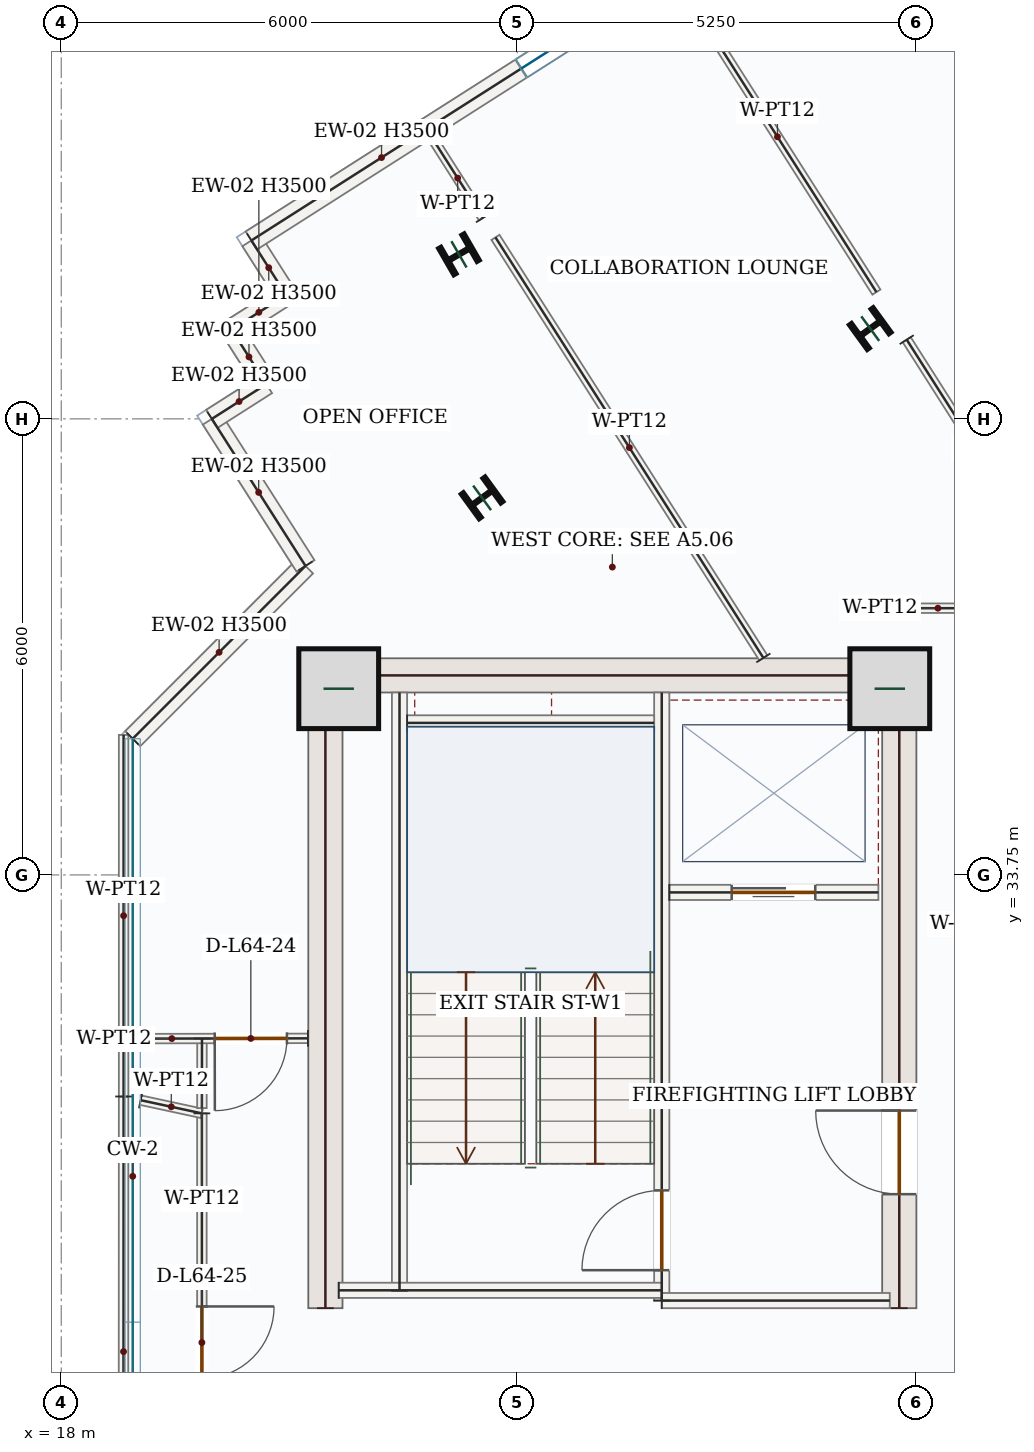
"""IFC4 building model, lengths in metres.
Left out: names, types, materials, properties, quantities, classifications, styles, units other than length and angle.
Written with IfcOpenShell. Run it as: python <this file> out.ifc"""

import sys

from ifc_helpers import new_model, si_unit, direction, frame, frame_2d, origin, origin_2d, place, context, subcontext, project, spatial, rectangle, i_section, extrude, source, transform, mapped, element, fill, save


model = new_model("IFC4")
c1 = context("Model", 3, precision=1e-05, world=origin(), true_north=direction((0.0, 1.0)))
c2 = subcontext(c1, "Body", "Model", "MODEL_VIEW")
j1 = project(units=[si_unit("LENGTHUNIT", "METRE"), si_unit("PLANEANGLEUNIT", "RADIAN")], contexts=[c1])
p1 = place(None, origin())
s1 = spatial("IfcSite", under=j1, at=p1, CompositionType="ELEMENT")
p2 = place(p1, origin())
s2 = spatial("IfcBuilding", under=s1, at=p2, CompositionType="ELEMENT")
p3 = place(p2, frame((0.0, 0.0, 269.1)))
s3 = spatial("IfcBuildingStorey", under=s2, at=p3, CompositionType="ELEMENT", Elevation=269.1)
m1 = source(origin(), c2, "Body", "SweptSolid", [
    extrude(rectangle(XDim=8.55, YDim=0.45, at=frame_2d((4.275, 0.0))), origin(), (0.0, 0.0, 1.0), 3.5),
])
p4 = place(p3, frame((21.475, 28.05, 0.0), z_axis=(0.0, 0.0, 1.0), x_axis=(0.0, 1.0, 0.0)))
e1 = element("IfcWall", 1, at=p4, inside=s3, PredefinedType="SHEAR", context=c2, shape_type="MappedRepresentation", body=[
    mapped(m1, transform((0.0, 0.0, 0.0), x_axis=(1.0, 0.0, 0.0), y_axis=(0.0, 1.0, 0.0), z_axis=(0.0, 0.0, 1.0), scale=1.0)),
])
p5 = place(p3, frame((29.025, 28.05, 0.0), z_axis=(0.0, 0.0, 1.0), x_axis=(0.0, 1.0, 0.0)))
e2 = element("IfcWall", 2, at=p5, inside=s3, PredefinedType="SHEAR", context=c2, shape_type="SweptSolid", body=[
    extrude(rectangle(XDim=8.55, YDim=0.45, at=frame_2d((4.275, 0.0))), origin(), (0.0, 0.0, 1.0), 3.5),
])
p6 = place(p5, frame((1.5, 0.0, 0.0)))
e3 = element("IfcOpeningElement", 3, at=p6, cuts=e2, PredefinedType="OPENING", context=c2, shape_type="SweptSolid", body=[
    extrude(rectangle(XDim=1.1, YDim=2.2, at=frame_2d((0.55, 1.1))), frame((0.0, 0.235, 0.0), z_axis=(0.0, -1.0, 0.0), x_axis=(1.0, 0.0, 0.0)), (0.0, 0.0, 1.0), 0.47),
])
m2 = source(origin(), c2, "Body", "SweptSolid", [
    extrude(rectangle(XDim=7.1, YDim=0.45, at=frame_2d((3.55, 0.0))), origin(), (0.0, 0.0, 1.0), 3.5),
])
p7 = place(p3, frame((21.7, 36.375, 0.0), z_axis=(0.0, 0.0, 1.0), x_axis=(1.0, 0.0, 0.0)))
e4 = element("IfcWall", 4, at=p7, inside=s3, PredefinedType="SHEAR", context=c2, shape_type="MappedRepresentation", body=[
    mapped(m2, transform((0.0, 0.0, 0.0), x_axis=(1.0, 0.0, 0.0), y_axis=(0.0, 1.0, 0.0), z_axis=(0.0, 0.0, 1.0), scale=1.0)),
])
m3 = source(origin(), c2, "Body", "SweptSolid", [
    extrude(rectangle(XDim=1.05, YDim=1.05, at=origin_2d()), origin(), (0.0, 0.0, 1.0), 3.75),
])
for number, where, z_axis, x_axis in (
    (5, (21.65, 36.2, 0.0), (0.0, 0.0, 1.0), (1.0, 0.0, 0.0)),
    (6, (28.9, 36.2, 0.0), (0.0, 0.0, 1.0), (1.0, 0.0, 0.0)),
):
    element("IfcColumn", number, at=place(p3, frame(where, z_axis=z_axis, x_axis=x_axis)), inside=s3, PredefinedType="COLUMN", context=c2, shape_type="MappedRepresentation", body=[
        mapped(m3, transform((0.0, 0.0, 0.0), x_axis=(1.0, 0.0, 0.0), y_axis=(0.0, 1.0, 0.0), z_axis=(0.0, 0.0, 1.0), scale=1.0)),
    ])
m4 = source(origin(), c2, "Body", "SweptSolid", [
    extrude(i_section(OverallWidth=0.399, OverallDepth=0.386, WebThickness=0.021, FlangeThickness=0.033, FilletRadius=0.018, at=origin_2d()), origin(), (0.0, 0.0, 1.0), 3.75),
])
for number, where, z_axis, x_axis in (
    (7, (28.643, 40.937, 0.0), (0.0, 0.0, 1.0), (-0.588, 0.809, 0.0)),
    (8, (23.536, 38.711, 0.0), (0.0, 0.0, 1.0), (-0.588, 0.809, 0.0)),
    (9, (23.232, 41.914, 0.0), (0.0, 0.0, 1.0), (-0.5, 0.866, 0.0)),
):
    element("IfcColumn", number, at=place(p3, frame(where, z_axis=z_axis, x_axis=x_axis)), inside=s3, PredefinedType="COLUMN", context=c2, shape_type="MappedRepresentation", body=[
        mapped(m4, transform((0.0, 0.0, 0.0), x_axis=(1.0, 0.0, 0.0), y_axis=(0.0, 1.0, 0.0), z_axis=(0.0, 0.0, 1.0), scale=1.0)),
    ])
m5 = source(origin(), c2, "Body", "SweptSolid", [
    extrude(rectangle(XDim=3.215, YDim=0.28, at=frame_2d((1.607, 0.0))), origin(), (0.0, 0.0, 1.0), 3.5),
])
p8 = place(p3, frame((18.94, 35.542, 0.0), z_axis=(0.0, 0.0, 1.0), x_axis=(0.707106781187, 0.707106781187, 0.0)))
e10 = element("IfcWall", 10, at=p8, inside=s3, PredefinedType="SOLIDWALL", context=c2, shape_type="MappedRepresentation", body=[
    mapped(m5, transform((0.0, 0.0, 0.0), x_axis=(1.0, 0.0, 0.0), y_axis=(0.0, 1.0, 0.0), z_axis=(0.0, 0.0, 1.0), scale=1.0)),
])
m6 = source(origin(), c2, "Body", "SweptSolid", [
    extrude(rectangle(XDim=2.293, YDim=0.28, at=frame_2d((1.147, 0.0))), origin(), (0.0, 0.0, 1.0), 3.5),
])
p9 = place(p3, frame((21.213, 37.815, 0.0), z_axis=(0.0, 0.0, 1.0), x_axis=(-0.53726116654, 0.843415934713, 0.0)))
e11 = element("IfcWall", 11, at=p9, inside=s3, PredefinedType="SOLIDWALL", context=c2, shape_type="MappedRepresentation", body=[
    mapped(m6, transform((0.0, 0.0, 0.0), x_axis=(1.0, 0.0, 0.0), y_axis=(0.0, 1.0, 0.0), z_axis=(0.0, 0.0, 1.0), scale=1.0)),
])
m7 = source(origin(), c2, "Body", "SweptSolid", [
    extrude(rectangle(XDim=0.85, YDim=0.28, at=frame_2d((0.425, 0.0))), origin(), (0.0, 0.0, 1.0), 3.5),
])
for number, where, z_axis, x_axis in (
    (12, (19.981, 39.75, 0.0), (0.0, 0.0, 1.0), (0.843, 0.537, 0.0)),
    (13, (20.698, 40.206, 0.0), (0.0, 0.0, 1.0), (-0.537, 0.843, 0.0)),
    (14, (20.241, 40.923, 0.0), (0.0, 0.0, 1.0), (0.843, 0.537, 0.0)),
    (15, (20.958, 41.38, 0.0), (0.0, 0.0, 1.0), (-0.537, 0.843, 0.0)),
):
    element("IfcWall", number, at=place(p3, frame(where, z_axis=z_axis, x_axis=x_axis)), inside=s3, PredefinedType="SOLIDWALL", context=c2, shape_type="MappedRepresentation", body=[
        mapped(m7, transform((0.0, 0.0, 0.0), x_axis=(1.0, 0.0, 0.0), y_axis=(0.0, 1.0, 0.0), z_axis=(0.0, 0.0, 1.0), scale=1.0)),
    ])
p10 = place(p3, frame((20.501, 42.097, 0.0), z_axis=(0.0, 0.0, 1.0), x_axis=(0.843388777764, 0.537303796322, 0.0)))
e16 = element("IfcWall", 16, at=p10, inside=s3, PredefinedType="SOLIDWALL", context=c2, shape_type="SweptSolid", body=[
    extrude(rectangle(XDim=9.92, YDim=0.28, at=frame_2d((4.96, 0.0))), origin(), (0.0, 0.0, 1.0), 3.5),
])
p11 = place(p10, frame((4.21, 0.0, 0.85)))
e17 = element("IfcOpeningElement", 17, at=p11, cuts=e16, PredefinedType="OPENING", context=c2, shape_type="SweptSolid", body=[
    extrude(rectangle(XDim=1.5, YDim=1.5, at=frame_2d((0.75, 0.75))), frame((0.0, 0.15, 0.0), z_axis=(0.0, -1.0, 0.0), x_axis=(1.0, 0.0, 0.0)), (0.0, 0.0, 1.0), 0.3),
])
m8 = source(origin(), c2, "Body", "SweptSolid", [
    extrude(rectangle(XDim=7.87, YDim=0.2, at=frame_2d((3.935, 0.0))), origin(), (0.0, 0.0, 1.0), 3.5),
])
p12 = place(p3, frame((22.45, 28.28, 0.0), z_axis=(0.0, 0.0, 1.0), x_axis=(0.0, 1.0, 0.0)))
e18 = element("IfcWall", 18, at=p12, inside=s3, PredefinedType="SOLIDWALL", context=c2, shape_type="MappedRepresentation", body=[
    mapped(m8, transform((0.0, 0.0, 0.0), x_axis=(1.0, 0.0, 0.0), y_axis=(0.0, 1.0, 0.0), z_axis=(0.0, 0.0, 1.0), scale=1.0)),
])
p13 = place(p3, frame((25.9, 28.15, 0.0), z_axis=(0.0, 0.0, 1.0), x_axis=(0.0, 1.0, 0.0)))
e19 = element("IfcWall", 19, at=p13, inside=s3, PredefinedType="SOLIDWALL", context=c2, shape_type="SweptSolid", body=[
    extrude(rectangle(XDim=8.0, YDim=0.2, at=frame_2d((4.0, 0.0))), origin(), (0.0, 0.0, 1.0), 3.5),
])
p14 = place(p13, frame((0.4, 0.0, 0.0)))
e20 = element("IfcOpeningElement", 20, at=p14, cuts=e19, PredefinedType="OPENING", context=c2, shape_type="SweptSolid", body=[
    extrude(rectangle(XDim=1.05, YDim=2.15, at=frame_2d((0.525, 1.075))), frame((0.0, 0.11, 0.0), z_axis=(0.0, -1.0, 0.0), x_axis=(1.0, 0.0, 0.0)), (0.0, 0.0, 1.0), 0.22),
])
m9 = source(origin(), c2, "Body", "SweptSolid", [
    extrude(rectangle(XDim=4.25, YDim=0.2, at=frame_2d((2.125, 0.0))), origin(), (0.0, 0.0, 1.0), 3.5),
])
p15 = place(p3, frame((21.65, 28.285, 0.0), z_axis=(0.0, 0.0, 1.0), x_axis=(1.0, 0.0, 0.0)))
e21 = element("IfcWall", 21, at=p15, inside=s3, PredefinedType="SOLIDWALL", context=c2, shape_type="MappedRepresentation", body=[
    mapped(m9, transform((0.0, 0.0, 0.0), x_axis=(1.0, 0.0, 0.0), y_axis=(0.0, 1.0, 0.0), z_axis=(0.0, 0.0, 1.0), scale=1.0)),
])
m10 = source(origin(), c2, "Body", "SweptSolid", [
    extrude(rectangle(XDim=3.0, YDim=0.2, at=frame_2d((1.5, 0.0))), origin(), (0.0, 0.0, 1.0), 3.5),
])
p16 = place(p3, frame((25.9, 28.15, 0.0), z_axis=(0.0, 0.0, 1.0), x_axis=(1.0, 0.0, 0.0)))
e22 = element("IfcWall", 22, at=p16, inside=s3, PredefinedType="SOLIDWALL", context=c2, shape_type="MappedRepresentation", body=[
    mapped(m10, transform((0.0, 0.0, 0.0), x_axis=(1.0, 0.0, 0.0), y_axis=(0.0, 1.0, 0.0), z_axis=(0.0, 0.0, 1.0), scale=1.0)),
])
m11 = source(origin(), c2, "Body", "SweptSolid", [
    extrude(rectangle(XDim=3.25, YDim=0.2, at=frame_2d((1.625, 0.0))), origin(), (0.0, 0.0, 1.0), 3.5),
])
p17 = place(p3, frame((22.55, 35.75, 0.0), z_axis=(0.0, 0.0, 1.0), x_axis=(1.0, 0.0, 0.0)))
e23 = element("IfcWall", 23, at=p17, inside=s3, PredefinedType="SOLIDWALL", context=c2, shape_type="MappedRepresentation", body=[
    mapped(m11, transform((0.0, 0.0, 0.0), x_axis=(1.0, 0.0, 0.0), y_axis=(0.0, 1.0, 0.0), z_axis=(0.0, 0.0, 1.0), scale=1.0)),
])
p18 = place(p3, frame((26.0, 33.52, 0.0), z_axis=(0.0, 0.0, 1.0), x_axis=(1.0, 0.0, 0.0)))
e24 = element("IfcWall", 24, at=p18, inside=s3, PredefinedType="SOLIDWALL", context=c2, shape_type="SweptSolid", body=[
    extrude(rectangle(XDim=2.75, YDim=0.2, at=frame_2d((1.375, 0.0))), origin(), (0.0, 0.0, 1.0), 3.5),
])
p19 = place(p18, frame((0.82, 0.0, 0.0)))
e25 = element("IfcOpeningElement", 25, at=p19, cuts=e24, PredefinedType="OPENING", context=c2, shape_type="SweptSolid", body=[
    extrude(rectangle(XDim=1.1, YDim=2.15, at=frame_2d((0.55, 1.075))), frame((0.0, 0.11, 0.0), z_axis=(0.0, -1.0, 0.0), x_axis=(1.0, 0.0, 0.0)), (0.0, 0.0, 1.0), 0.22),
])
m12 = source(origin(), c2, "Body", "SweptSolid", [
    extrude(rectangle(XDim=4.188, YDim=0.125, at=frame_2d((2.094, 0.0))), origin(), (0.0, 0.0, 1.0), 3.5),
])
p20 = place(p3, frame((29.123, 40.792, 0.0), z_axis=(0.0, 0.0, 1.0), x_axis=(0.537264008944, -0.843414124078, 0.0)))
e26 = element("IfcWall", 26, at=p20, inside=s3, PredefinedType="PARTITIONING", context=c2, shape_type="MappedRepresentation", body=[
    mapped(m12, transform((0.0, 0.0, 0.0), x_axis=(1.0, 0.0, 0.0), y_axis=(0.0, 1.0, 0.0), z_axis=(0.0, 0.0, 1.0), scale=1.0)),
])
p21 = place(p3, frame((31.292, 37.26, 0.0), z_axis=(0.0, 0.0, 1.0), x_axis=(-0.999999820546, -0.000599089277, 0.0)))
e27 = element("IfcWall", 27, at=p21, inside=s3, PredefinedType="PARTITIONING", context=c2, shape_type="SweptSolid", body=[
    extrude(rectangle(XDim=2.038, YDim=0.125, at=frame_2d((1.019, 0.0))), origin(), (0.0, 0.0, 1.0), 3.5),
])
p22 = place(p21, frame((0.381, 0.0, 0.0)))
e28 = element("IfcOpeningElement", 28, at=p22, cuts=e27, PredefinedType="OPENING", context=c2, shape_type="SweptSolid", body=[
    extrude(rectangle(XDim=0.95, YDim=2.15, at=frame_2d((0.475, 1.075))), frame((0.0, 0.073, 0.0), z_axis=(0.0, -1.0, 0.0), x_axis=(1.0, 0.0, 0.0)), (0.0, 0.0, 1.0), 0.145),
])
m13 = source(origin(), c2, "Body", "SweptSolid", [
    extrude(rectangle(XDim=6.56, YDim=0.125, at=frame_2d((3.28, 0.0))), origin(), (0.0, 0.0, 1.0), 3.5),
])
p23 = place(p3, frame((27.237, 36.605, 0.0), z_axis=(0.0, 0.0, 1.0), x_axis=(-0.537282422054, 0.843402394443, 0.0)))
e29 = element("IfcWall", 29, at=p23, inside=s3, PredefinedType="PARTITIONING", context=c2, shape_type="MappedRepresentation", body=[
    mapped(m13, transform((0.0, 0.0, 0.0), x_axis=(1.0, 0.0, 0.0), y_axis=(0.0, 1.0, 0.0), z_axis=(0.0, 0.0, 1.0), scale=1.0)),
])
m14 = source(origin(), c2, "Body", "SweptSolid", [
    extrude(rectangle(XDim=1.241, YDim=0.125, at=frame_2d((0.621, 0.0))), origin(), (0.0, 0.0, 1.0), 3.5),
])
p24 = place(p3, frame((23.549, 42.394, 0.0), z_axis=(0.0, 0.0, 1.0), x_axis=(-0.537244446477, 0.843426585264, 0.0)))
e30 = element("IfcWall", 30, at=p24, inside=s3, PredefinedType="PARTITIONING", context=c2, shape_type="MappedRepresentation", body=[
    mapped(m14, transform((0.0, 0.0, 0.0), x_axis=(1.0, 0.0, 0.0), y_axis=(0.0, 1.0, 0.0), z_axis=(0.0, 0.0, 1.0), scale=1.0)),
])
m15 = source(origin(), c2, "Body", "SweptSolid", [
    extrude(rectangle(XDim=4.846, YDim=0.125, at=frame_2d((2.423, 0.0))), origin(), (0.0, 0.0, 1.0), 3.5),
])
p25 = place(p3, frame((26.12, 45.505, 0.0), z_axis=(0.0, 0.0, 1.0), x_axis=(0.537305688893, -0.843387572047, 0.0)))
e31 = element("IfcWall", 31, at=p25, inside=s3, PredefinedType="PARTITIONING", context=c2, shape_type="MappedRepresentation", body=[
    mapped(m15, transform((0.0, 0.0, 0.0), x_axis=(1.0, 0.0, 0.0), y_axis=(0.0, 1.0, 0.0), z_axis=(0.0, 0.0, 1.0), scale=1.0)),
])
p26 = place(p3, frame((19.85, 30.613, 0.0), z_axis=(0.0, 0.0, 1.0), x_axis=(0.0, -1.0, 0.0)))
e32 = element("IfcWall", 32, at=p26, inside=s3, PredefinedType="PARTITIONING", context=c2, shape_type="SweptSolid", body=[
    extrude(rectangle(XDim=8.207, YDim=0.125, at=frame_2d((4.104, 0.0))), origin(), (0.0, 0.0, 1.0), 3.5),
])
p27 = place(p26, frame((2.54, 0.0, 0.0)))
e33 = element("IfcOpeningElement", 33, at=p27, cuts=e32, PredefinedType="OPENING", context=c2, shape_type="SweptSolid", body=[
    extrude(rectangle(XDim=0.95, YDim=2.15, at=frame_2d((0.475, 1.075))), frame((0.0, 0.073, 0.0), z_axis=(0.0, -1.0, 0.0), x_axis=(1.0, 0.0, 0.0)), (0.0, 0.0, 1.0), 0.145),
])
m16 = source(origin(), c2, "Body", "SweptSolid", [
    extrude(rectangle(XDim=6.713, YDim=0.125, at=frame_2d((3.356, 0.0))), origin(), (0.0, 0.0, 1.0), 3.5),
])
p28 = place(p3, frame((18.818, 24.122, 0.0), z_axis=(0.0, 0.0, 1.0), x_axis=(0.000327332225, 0.999999946427, 0.0)))
e34 = element("IfcWall", 34, at=p28, inside=s3, PredefinedType="PARTITIONING", context=c2, shape_type="MappedRepresentation", body=[
    mapped(m16, transform((0.0, 0.0, 0.0), x_axis=(1.0, 0.0, 0.0), y_axis=(0.0, 1.0, 0.0), z_axis=(0.0, 0.0, 1.0), scale=1.0)),
])
m17 = source(origin(), c2, "Body", "SweptSolid", [
    extrude(rectangle(XDim=0.824, YDim=0.125, at=frame_2d((0.412, 0.0))), origin(), (0.0, 0.0, 1.0), 3.5),
])
p29 = place(p3, frame((19.045, 30.786, 0.0), z_axis=(0.0, 0.0, 1.0), x_axis=(0.977541402347, -0.210743461816, 0.0)))
e35 = element("IfcWall", 35, at=p29, inside=s3, PredefinedType="PARTITIONING", context=c2, shape_type="MappedRepresentation", body=[
    mapped(m17, transform((0.0, 0.0, 0.0), x_axis=(1.0, 0.0, 0.0), y_axis=(0.0, 1.0, 0.0), z_axis=(0.0, 0.0, 1.0), scale=1.0)),
])
m18 = source(origin(), c2, "Body", "SweptSolid", [
    extrude(rectangle(XDim=0.916, YDim=0.125, at=frame_2d((0.458, 0.0))), origin(), (0.0, 0.0, 1.0), 3.5),
])
p30 = place(p3, frame((19.851, 31.598, 0.0), z_axis=(0.0, 0.0, 1.0), x_axis=(-0.001332976688, -0.999999111586, 0.0)))
e36 = element("IfcWall", 36, at=p30, inside=s3, PredefinedType="PARTITIONING", context=c2, shape_type="MappedRepresentation", body=[
    mapped(m18, transform((0.0, 0.0, 0.0), x_axis=(1.0, 0.0, 0.0), y_axis=(0.0, 1.0, 0.0), z_axis=(0.0, 0.0, 1.0), scale=1.0)),
])
m19 = source(origin(), c2, "Body", "SweptSolid", [
    extrude(rectangle(XDim=4.757, YDim=0.125, at=frame_2d((2.378, 0.0))), origin(), (0.0, 0.0, 1.0), 3.5),
])
p31 = place(p3, frame((18.82, 30.835, 0.0), z_axis=(0.0, 0.0, 1.0), x_axis=(0.0, 1.0, 0.0)))
e37 = element("IfcWall", 37, at=p31, inside=s3, PredefinedType="PARTITIONING", context=c2, shape_type="MappedRepresentation", body=[
    mapped(m19, transform((0.0, 0.0, 0.0), x_axis=(1.0, 0.0, 0.0), y_axis=(0.0, 1.0, 0.0), z_axis=(0.0, 0.0, 1.0), scale=1.0)),
])
p32 = place(p3, frame((21.245, 31.6, 0.0), z_axis=(0.0, 0.0, 1.0), x_axis=(-0.999998798684, -0.001550042425, 0.0)))
e38 = element("IfcWall", 38, at=p32, inside=s3, PredefinedType="PARTITIONING", context=c2, shape_type="SweptSolid", body=[
    extrude(rectangle(XDim=2.205, YDim=0.125, at=frame_2d((1.103, 0.0))), origin(), (0.0, 0.0, 1.0), 3.5),
])
p33 = place(p32, frame((0.276, 0.0, 0.0)))
e39 = element("IfcOpeningElement", 39, at=p33, cuts=e38, PredefinedType="OPENING", context=c2, shape_type="SweptSolid", body=[
    extrude(rectangle(XDim=0.95, YDim=2.15, at=frame_2d((0.475, 1.075))), frame((0.0, 0.073, 0.0), z_axis=(0.0, -1.0, 0.0), x_axis=(1.0, 0.0, 0.0)), (0.0, 0.0, 1.0), 0.145),
])
m20 = source(origin(), c2, "Body", "SweptSolid", [
    extrude(rectangle(XDim=1.5, YDim=1.5, at=frame_2d((0.75, 0.75))), frame((0.0, 0.03, 0.0), z_axis=(0.0, -1.0, 0.0), x_axis=(1.0, 0.0, 0.0)), (0.0, 0.0, 1.0), 0.06),
])
p34 = place(p11, origin())
e40 = element("IfcWindow", 40, at=p34, inside=s3, PartitioningType="SINGLE_PANEL", PredefinedType="WINDOW", context=c2, shape_type="MappedRepresentation", body=[
    mapped(m20, transform((0.0, 0.0, 0.0), x_axis=(1.0, 0.0, 0.0), y_axis=(0.0, 1.0, 0.0), z_axis=(0.0, 0.0, 1.0), scale=1.0)),
])
fill(e17, e40)
m21 = source(origin(), c2, "Body", "SweptSolid", [
    extrude(rectangle(XDim=1.05, YDim=2.15, at=frame_2d((0.525, 1.075))), frame((0.0, 0.025, 0.0), z_axis=(0.0, -1.0, 0.0), x_axis=(1.0, 0.0, 0.0)), (0.0, 0.0, 1.0), 0.05),
])
p35 = place(p14, origin())
e41 = element("IfcDoor", 41, at=p35, inside=s3, OperationType="SINGLE_SWING_LEFT", PredefinedType="DOOR", context=c2, shape_type="MappedRepresentation", body=[
    mapped(m21, transform((0.0, 0.0, 0.0), x_axis=(1.0, 0.0, 0.0), y_axis=(0.0, 1.0, 0.0), z_axis=(0.0, 0.0, 1.0), scale=1.0)),
])
fill(e20, e41)
m22 = source(origin(), c2, "Body", "SweptSolid", [
    extrude(rectangle(XDim=1.1, YDim=2.15, at=frame_2d((0.55, 1.075))), frame((0.0, 0.025, 0.0), z_axis=(0.0, -1.0, 0.0), x_axis=(1.0, 0.0, 0.0)), (0.0, 0.0, 1.0), 0.05),
])
p36 = place(p19, origin())
e42 = element("IfcDoor", 42, at=p36, inside=s3, OperationType="DOUBLE_DOOR_SLIDING", PredefinedType="DOOR", context=c2, shape_type="MappedRepresentation", body=[
    mapped(m22, transform((0.0, 0.0, 0.0), x_axis=(1.0, 0.0, 0.0), y_axis=(0.0, 1.0, 0.0), z_axis=(0.0, 0.0, 1.0), scale=1.0)),
])
fill(e25, e42)
m23 = source(origin(), c2, "Body", "SweptSolid", [
    extrude(rectangle(XDim=1.1, YDim=2.2, at=frame_2d((0.55, 1.1))), frame((0.0, 0.025, 0.0), z_axis=(0.0, -1.0, 0.0), x_axis=(1.0, 0.0, 0.0)), (0.0, 0.0, 1.0), 0.05),
])
p37 = place(p6, origin())
e43 = element("IfcDoor", 43, at=p37, inside=s3, OperationType="SINGLE_SWING_RIGHT", PredefinedType="DOOR", context=c2, shape_type="MappedRepresentation", body=[
    mapped(m23, transform((0.0, 0.0, 0.0), x_axis=(1.0, 0.0, 0.0), y_axis=(0.0, 1.0, 0.0), z_axis=(0.0, 0.0, 1.0), scale=1.0)),
])
fill(e3, e43)
m24 = source(origin(), c2, "Body", "SweptSolid", [
    extrude(rectangle(XDim=0.95, YDim=2.15, at=frame_2d((0.475, 1.075))), frame((0.0, 0.025, 0.0), z_axis=(0.0, -1.0, 0.0), x_axis=(1.0, 0.0, 0.0)), (0.0, 0.0, 1.0), 0.05),
])
p38 = place(p33, origin())
e44 = element("IfcDoor", 44, at=p38, inside=s3, OperationType="SINGLE_SWING_RIGHT", PredefinedType="DOOR", context=c2, shape_type="MappedRepresentation", body=[
    mapped(m24, transform((0.0, 0.0, 0.0), x_axis=(1.0, 0.0, 0.0), y_axis=(0.0, 1.0, 0.0), z_axis=(0.0, 0.0, 1.0), scale=1.0)),
])
fill(e39, e44)
p39 = place(p27, origin())
e45 = element("IfcDoor", 45, at=p39, inside=s3, OperationType="SINGLE_SWING_LEFT", PredefinedType="DOOR", context=c2, shape_type="MappedRepresentation", body=[
    mapped(m24, transform((0.0, 0.0, 0.0), x_axis=(1.0, 0.0, 0.0), y_axis=(0.0, 1.0, 0.0), z_axis=(0.0, 0.0, 1.0), scale=1.0)),
])
fill(e33, e45)
save(model, sys.argv[1])
